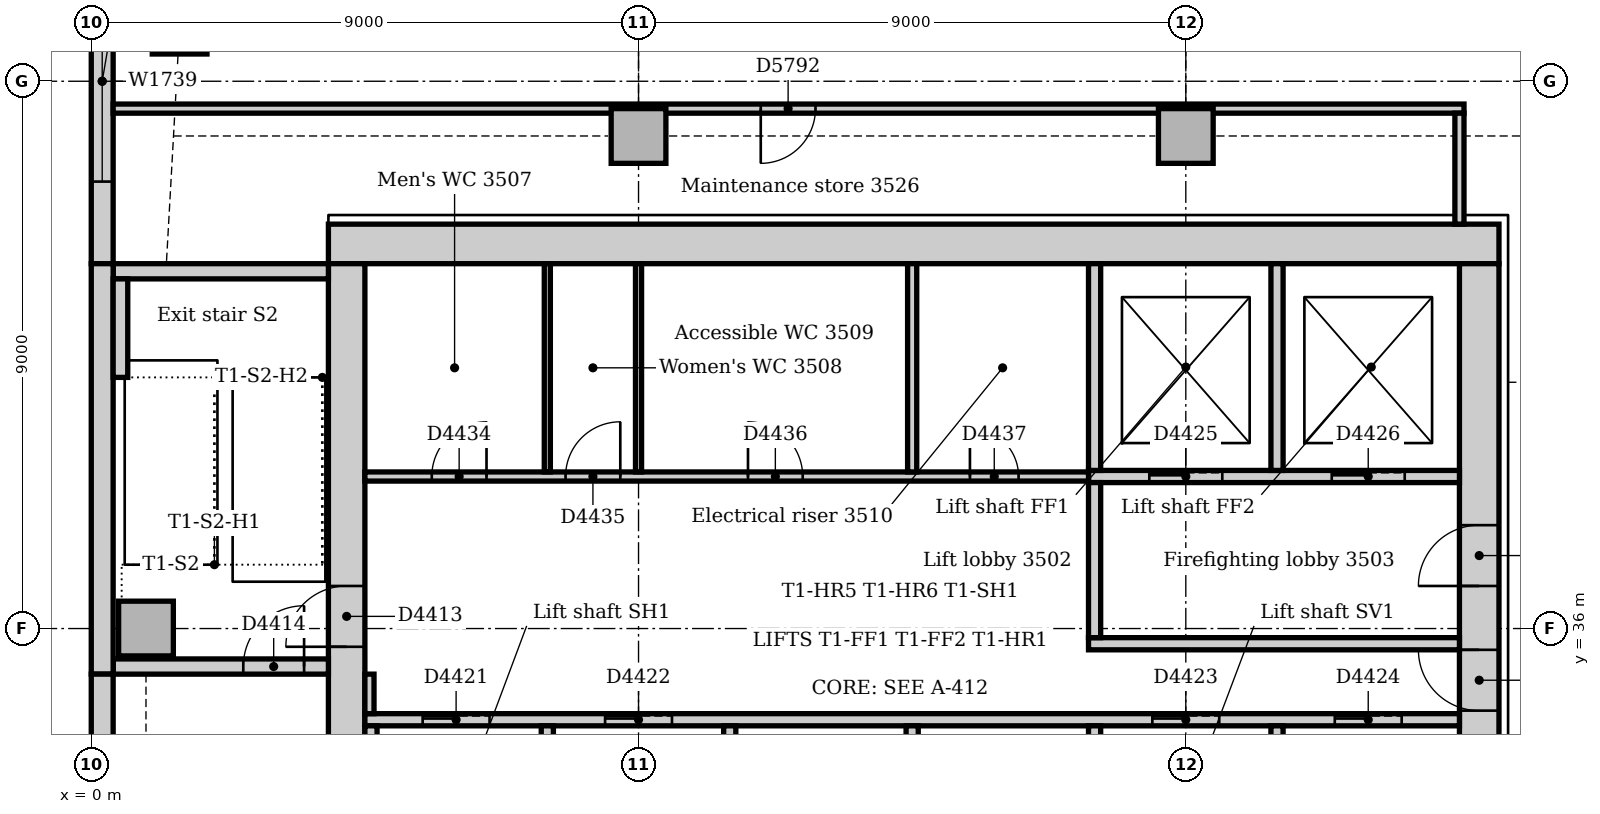
"""IFC4 building model, lengths in metres.
Left out: names, types, materials, properties, quantities, classifications, styles, units other than length and angle.
Written with IfcOpenShell. Run it as: python <this file> out.ifc"""

import sys

from ifc_helpers import new_model, si_unit, direction, frame, frame_2d, origin, origin_2d, place, context, subcontext, project, spatial, rectangle, extrude, element, fill, save


model = new_model("IFC4")
c1 = context("Model", 3, precision=1e-05, world=origin(), true_north=direction((0.0, 1.0)))
c2 = subcontext(c1, "Body", "Model", "MODEL_VIEW")
j1 = project(units=[si_unit("LENGTHUNIT", "METRE"), si_unit("PLANEANGLEUNIT", "RADIAN")], contexts=[c1])
p1 = place(None, origin())
s1 = spatial("IfcSite", under=j1, at=p1, CompositionType="ELEMENT")
p2 = place(p1, origin())
s2 = spatial("IfcBuilding", under=s1, at=p2, CompositionType="ELEMENT")
p3 = place(p2, frame((0.0, 0.0, 149.0)))
s3 = spatial("IfcBuildingStorey", under=s2, at=p3, CompositionType="ELEMENT", Elevation=149.0)
p4 = place(p3, frame((23.15, 42.325, 0.0), z_axis=(0.0, 0.0, 1.0), x_axis=(-1.0, 0.0, 0.0)))
e1 = element("IfcWall", 1, at=p4, inside=s3, PredefinedType="SOLIDWALL", context=c2, shape_type="SweptSolid", body=[
    extrude(rectangle(XDim=19.25, YDim=0.65, at=frame_2d((9.625, 0.0))), origin(), (0.0, 0.0, 1.0), 4.0),
])
p5 = place(p3, frame((22.825, 31.5, 0.0), z_axis=(0.0, 0.0, 1.0), x_axis=(0.0, 1.0, 0.0)))
e2 = element("IfcWall", 2, at=p5, inside=s3, PredefinedType="SOLIDWALL", context=c2, shape_type="SweptSolid", body=[
    extrude(rectangle(XDim=10.5, YDim=0.65, at=frame_2d((5.25, 0.0))), origin(), (0.0, 0.0, 1.0), 4.0),
])
p6 = place(p5, frame((3.15, 0.0, 0.0)))
e3 = element("IfcOpeningElement", 3, at=p6, cuts=e2, PredefinedType="OPENING", context=c2, shape_type="SweptSolid", body=[
    extrude(rectangle(XDim=1.0, YDim=2.1, at=frame_2d((0.5, 1.05))), frame((0.0, 0.335, 0.0), z_axis=(0.0, -1.0, 0.0), x_axis=(1.0, 0.0, 0.0)), (0.0, 0.0, 1.0), 0.67),
])
p7 = place(p5, frame((5.2, 0.0, 0.0)))
e4 = element("IfcOpeningElement", 4, at=p7, cuts=e2, PredefinedType="OPENING", context=c2, shape_type="SweptSolid", body=[
    extrude(rectangle(XDim=1.0, YDim=2.1, at=frame_2d((0.5, 1.05))), frame((0.0, 0.335, 0.0), z_axis=(0.0, -1.0, 0.0), x_axis=(1.0, 0.0, 0.0)), (0.0, 0.0, 1.0), 0.67),
])
p8 = place(p3, frame((4.2, 42.0, 0.0), z_axis=(0.0, 0.0, 1.0), x_axis=(0.0, -1.0, 0.0)))
e5 = element("IfcWall", 5, at=p8, inside=s3, PredefinedType="SOLIDWALL", context=c2, shape_type="SweptSolid", body=[
    extrude(rectangle(XDim=10.5, YDim=0.6, at=frame_2d((5.25, 0.0))), origin(), (0.0, 0.0, 1.0), 4.0),
])
p9 = place(p8, frame((5.3, 0.0, 0.0)))
e6 = element("IfcOpeningElement", 6, at=p9, cuts=e5, PredefinedType="OPENING", context=c2, shape_type="SweptSolid", body=[
    extrude(rectangle(XDim=1.0, YDim=2.1, at=frame_2d((0.5, 1.05))), frame((0.0, 0.31, 0.0), z_axis=(0.0, -1.0, 0.0), x_axis=(1.0, 0.0, 0.0)), (0.0, 0.0, 1.0), 0.62),
])
p10 = place(p3, frame((0.36, 35.375, 0.0), z_axis=(0.0, 0.0, 1.0), x_axis=(1.0, 0.0, 0.0)))
e7 = element("IfcWall", 7, at=p10, inside=s3, PredefinedType="SOLIDWALL", context=c2, shape_type="SweptSolid", body=[
    extrude(rectangle(XDim=3.54, YDim=0.25, at=frame_2d((1.77, 0.0))), origin(), (0.0, 0.0, 1.0), 4.0),
])
p11 = place(p10, frame((2.14, 0.0, 0.0)))
e8 = element("IfcOpeningElement", 8, at=p11, cuts=e7, PredefinedType="OPENING", context=c2, shape_type="SweptSolid", body=[
    extrude(rectangle(XDim=1.0, YDim=2.1, at=frame_2d((0.5, 1.05))), frame((0.0, 0.135, 0.0), z_axis=(0.0, -1.0, 0.0), x_axis=(1.0, 0.0, 0.0)), (0.0, 0.0, 1.0), 0.27),
])
p12 = place(p3, frame((3.9, 41.875, 0.0), z_axis=(0.0, 0.0, 1.0), x_axis=(-1.0, 0.0, 0.0)))
e9 = element("IfcWall", 9, at=p12, inside=s3, PredefinedType="SOLIDWALL", context=c2, shape_type="SweptSolid", body=[
    extrude(rectangle(XDim=3.54, YDim=0.25, at=frame_2d((1.77, 0.0))), origin(), (0.0, 0.0, 1.0), 4.0),
])
p13 = place(p3, frame((0.9, 36.0, 0.0), z_axis=(0.0, 0.0, 1.0), x_axis=(1.0, 0.0, 0.0)))
e10 = element("IfcColumn", 10, at=p13, inside=s3, PredefinedType="COLUMN", context=c2, shape_type="SweptSolid", body=[
    extrude(rectangle(XDim=0.9, YDim=0.9, at=origin_2d()), origin(), (0.0, 0.0, 1.0), 4.0),
])
for number, where, z_axis, x_axis in (
    (11, (1.453, 45.898, 0.0), (0.0, 0.0, 1.0), (1.0, 0.0, 0.0)),
    (12, (9.0, 44.1, 0.0), (0.0, 0.0, 1.0), (1.0, 0.0, 0.0)),
    (13, (18.0, 44.1, 0.0), (0.0, 0.0, 1.0), (1.0, 0.0, 0.0)),
):
    element("IfcColumn", number, at=place(p3, frame(where, z_axis=z_axis, x_axis=x_axis)), inside=s3, PredefinedType="COLUMN", context=c2, shape_type="SweptSolid", body=[
        extrude(rectangle(XDim=0.9, YDim=0.9, at=origin_2d()), origin(), (0.0, 0.0, 1.0), 3.85),
    ])
p14 = place(p3, frame((0.18, 49.757, 0.0), z_axis=(0.0, 0.0, 1.0), x_axis=(0.0, -1.0, 0.0)))
e14 = element("IfcWall", 14, at=p14, inside=s3, PredefinedType="STANDARD", context=c2, shape_type="SweptSolid", body=[
    extrude(rectangle(XDim=7.757, YDim=0.36, at=frame_2d((3.879, 0.0))), origin(), (0.0, 0.0, 1.0), 3.85),
])
p15 = place(p14, frame((3.107, 0.0, 0.9)))
e15 = element("IfcOpeningElement", 15, at=p15, cuts=e14, PredefinedType="OPENING", context=c2, shape_type="SweptSolid", body=[
    extrude(rectangle(XDim=3.3, YDim=1.6, at=frame_2d((1.65, 0.8))), frame((0.0, 0.19, 0.0), z_axis=(0.0, -1.0, 0.0), x_axis=(1.0, 0.0, 0.0)), (0.0, 0.0, 1.0), 0.38),
])
p16 = place(p3, frame((0.18, 42.0, 0.0), z_axis=(0.0, 0.0, 1.0), x_axis=(0.0, -1.0, 0.0)))
e16 = element("IfcWall", 16, at=p16, inside=s3, PredefinedType="STANDARD", context=c2, shape_type="SweptSolid", body=[
    extrude(rectangle(XDim=6.75, YDim=0.36, at=frame_2d((3.375, 0.0))), origin(), (0.0, 0.0, 1.0), 3.85),
])
p17 = place(p3, frame((0.18, 35.25, 0.0), z_axis=(0.0, 0.0, 1.0), x_axis=(0.0, -1.0, 0.0)))
e17 = element("IfcWall", 17, at=p17, inside=s3, PredefinedType="STANDARD", context=c2, shape_type="SweptSolid", body=[
    extrude(rectangle(XDim=7.5, YDim=0.36, at=frame_2d((3.75, 0.0))), origin(), (0.0, 0.0, 1.0), 3.85),
])
p18 = place(p3, frame((0.48, 40.13, 0.0), z_axis=(0.0, 0.0, 1.0), x_axis=(0.0, 1.0, 0.0)))
e18 = element("IfcWall", 18, at=p18, inside=s3, PredefinedType="STANDARD", context=c2, shape_type="SweptSolid", body=[
    extrude(rectangle(XDim=1.62, YDim=0.24, at=frame_2d((0.81, 0.0))), origin(), (0.0, 0.0, 1.0), 4.0),
])
p19 = place(p3, frame((16.4, 35.75, 0.0), z_axis=(0.0, 0.0, 1.0), x_axis=(1.0, 0.0, 0.0)))
e19 = element("IfcWall", 19, at=p19, inside=s3, PredefinedType="PARTITIONING", context=c2, shape_type="SweptSolid", body=[
    extrude(rectangle(XDim=6.1, YDim=0.2, at=frame_2d((3.05, 0.0))), origin(), (0.0, 0.0, 1.0), 3.85),
])
p20 = place(p3, frame((16.4, 38.5, 0.0), z_axis=(0.0, 0.0, 1.0), x_axis=(1.0, 0.0, 0.0)))
e20 = element("IfcWall", 20, at=p20, inside=s3, PredefinedType="PARTITIONING", context=c2, shape_type="SweptSolid", body=[
    extrude(rectangle(XDim=6.1, YDim=0.2, at=frame_2d((3.05, 0.0))), origin(), (0.0, 0.0, 1.0), 3.85),
])
p21 = place(p20, frame((1.0, 0.0, 0.0)))
e21 = element("IfcOpeningElement", 21, at=p21, cuts=e20, PredefinedType="OPENING", context=c2, shape_type="SweptSolid", body=[
    extrude(rectangle(XDim=1.2, YDim=2.1, at=frame_2d((0.6, 1.05))), frame((0.0, 0.11, 0.0), z_axis=(0.0, -1.0, 0.0), x_axis=(1.0, 0.0, 0.0)), (0.0, 0.0, 1.0), 0.22),
])
p22 = place(p20, frame((4.0, 0.0, 0.0)))
e22 = element("IfcOpeningElement", 22, at=p22, cuts=e20, PredefinedType="OPENING", context=c2, shape_type="SweptSolid", body=[
    extrude(rectangle(XDim=1.2, YDim=2.1, at=frame_2d((0.6, 1.05))), frame((0.0, 0.11, 0.0), z_axis=(0.0, -1.0, 0.0), x_axis=(1.0, 0.0, 0.0)), (0.0, 0.0, 1.0), 0.22),
])
p23 = place(p3, frame((16.5, 35.85, 0.0), z_axis=(0.0, 0.0, 1.0), x_axis=(0.0, 1.0, 0.0)))
e23 = element("IfcWall", 23, at=p23, inside=s3, PredefinedType="PARTITIONING", context=c2, shape_type="SweptSolid", body=[
    extrude(rectangle(XDim=2.55, YDim=0.2, at=frame_2d((1.275, 0.0))), origin(), (0.0, 0.0, 1.0), 3.85),
])
p24 = place(p3, frame((4.5, 34.5, 0.0), z_axis=(0.0, 0.0, 1.0), x_axis=(1.0, 0.0, 0.0)))
e24 = element("IfcWall", 24, at=p24, inside=s3, PredefinedType="PARTITIONING", context=c2, shape_type="SweptSolid", body=[
    extrude(rectangle(XDim=18.0, YDim=0.2, at=frame_2d((9.0, 0.0))), origin(), (0.0, 0.0, 1.0), 3.85),
])
p25 = place(p24, frame((0.95, 0.0, 0.0)))
e25 = element("IfcOpeningElement", 25, at=p25, cuts=e24, PredefinedType="OPENING", context=c2, shape_type="SweptSolid", body=[
    extrude(rectangle(XDim=1.1, YDim=2.1, at=frame_2d((0.55, 1.05))), frame((0.0, 0.11, 0.0), z_axis=(0.0, -1.0, 0.0), x_axis=(1.0, 0.0, 0.0)), (0.0, 0.0, 1.0), 0.22),
])
p26 = place(p24, frame((3.95, 0.0, 0.0)))
e26 = element("IfcOpeningElement", 26, at=p26, cuts=e24, PredefinedType="OPENING", context=c2, shape_type="SweptSolid", body=[
    extrude(rectangle(XDim=1.1, YDim=2.1, at=frame_2d((0.55, 1.05))), frame((0.0, 0.11, 0.0), z_axis=(0.0, -1.0, 0.0), x_axis=(1.0, 0.0, 0.0)), (0.0, 0.0, 1.0), 0.22),
])
p27 = place(p24, frame((12.95, 0.0, 0.0)))
e27 = element("IfcOpeningElement", 27, at=p27, cuts=e24, PredefinedType="OPENING", context=c2, shape_type="SweptSolid", body=[
    extrude(rectangle(XDim=1.1, YDim=2.1, at=frame_2d((0.55, 1.05))), frame((0.0, 0.11, 0.0), z_axis=(0.0, -1.0, 0.0), x_axis=(1.0, 0.0, 0.0)), (0.0, 0.0, 1.0), 0.22),
])
p28 = place(p24, frame((15.95, 0.0, 0.0)))
e28 = element("IfcOpeningElement", 28, at=p28, cuts=e24, PredefinedType="OPENING", context=c2, shape_type="SweptSolid", body=[
    extrude(rectangle(XDim=1.1, YDim=2.1, at=frame_2d((0.55, 1.05))), frame((0.0, 0.11, 0.0), z_axis=(0.0, -1.0, 0.0), x_axis=(1.0, 0.0, 0.0)), (0.0, 0.0, 1.0), 0.22),
])
for number, where, z_axis, x_axis in (
    (29, (4.6, 31.75, 0.0), (0.0, 0.0, 1.0), (0.0, 1.0, 0.0)),
    (30, (7.5, 31.75, 0.0), (0.0, 0.0, 1.0), (0.0, 1.0, 0.0)),
    (31, (10.5, 31.75, 0.0), (0.0, 0.0, 1.0), (0.0, 1.0, 0.0)),
    (32, (13.5, 31.75, 0.0), (0.0, 0.0, 1.0), (0.0, 1.0, 0.0)),
    (33, (16.5, 31.75, 0.0), (0.0, 0.0, 1.0), (0.0, 1.0, 0.0)),
    (34, (19.5, 31.75, 0.0), (0.0, 0.0, 1.0), (0.0, 1.0, 0.0)),
):
    element("IfcWall", number, at=place(p3, frame(where, z_axis=z_axis, x_axis=x_axis)), inside=s3, PredefinedType="PARTITIONING", context=c2, shape_type="SweptSolid", body=[
        extrude(rectangle(XDim=2.65, YDim=0.2, at=frame_2d((1.325, 0.0))), origin(), (0.0, 0.0, 1.0), 3.85),
    ])
for number, where, z_axis, x_axis in (
    (35, (16.5, 38.6, 0.0), (0.0, 0.0, 1.0), (0.0, 1.0, 0.0)),
    (36, (19.5, 38.6, 0.0), (0.0, 0.0, 1.0), (0.0, 1.0, 0.0)),
):
    element("IfcWall", number, at=place(p3, frame(where, z_axis=z_axis, x_axis=x_axis)), inside=s3, PredefinedType="PARTITIONING", context=c2, shape_type="SweptSolid", body=[
        extrude(rectangle(XDim=3.4, YDim=0.2, at=frame_2d((1.7, 0.0))), origin(), (0.0, 0.0, 1.0), 3.85),
    ])
p29 = place(p3, frame((0.36, 44.55, 0.0), z_axis=(0.0, 0.0, 1.0), x_axis=(1.0, 0.0, 0.0)))
e37 = element("IfcWall", 37, at=p29, inside=s3, PredefinedType="PARTITIONING", context=c2, shape_type="SweptSolid", body=[
    extrude(rectangle(XDim=22.215, YDim=0.15, at=frame_2d((11.107, 0.0))), origin(), (0.0, 0.0, 1.0), 3.85),
])
p30 = place(p29, frame((10.65, 0.0, 0.0)))
e38 = element("IfcOpeningElement", 38, at=p30, cuts=e37, PredefinedType="OPENING", context=c2, shape_type="SweptSolid", body=[
    extrude(rectangle(XDim=0.9, YDim=2.1, at=frame_2d((0.45, 1.05))), frame((0.0, 0.085, 0.0), z_axis=(0.0, -1.0, 0.0), x_axis=(1.0, 0.0, 0.0)), (0.0, 0.0, 1.0), 0.17),
])
p31 = place(p3, frame((4.5, 38.5, 0.0), z_axis=(0.0, 0.0, 1.0), x_axis=(1.0, 0.0, 0.0)))
e39 = element("IfcWall", 39, at=p31, inside=s3, PredefinedType="PARTITIONING", context=c2, shape_type="SweptSolid", body=[
    extrude(rectangle(XDim=11.9, YDim=0.15, at=frame_2d((5.95, 0.0))), origin(), (0.0, 0.0, 1.0), 3.85),
])
p32 = place(p31, frame((1.1, 0.0, 0.0)))
e40 = element("IfcOpeningElement", 40, at=p32, cuts=e39, PredefinedType="OPENING", context=c2, shape_type="SweptSolid", body=[
    extrude(rectangle(XDim=0.9, YDim=2.1, at=frame_2d((0.45, 1.05))), frame((0.0, 0.085, 0.0), z_axis=(0.0, -1.0, 0.0), x_axis=(1.0, 0.0, 0.0)), (0.0, 0.0, 1.0), 0.17),
])
p33 = place(p31, frame((3.3, 0.0, 0.0)))
e41 = element("IfcOpeningElement", 41, at=p33, cuts=e39, PredefinedType="OPENING", context=c2, shape_type="SweptSolid", body=[
    extrude(rectangle(XDim=0.9, YDim=2.1, at=frame_2d((0.45, 1.05))), frame((0.0, 0.085, 0.0), z_axis=(0.0, -1.0, 0.0), x_axis=(1.0, 0.0, 0.0)), (0.0, 0.0, 1.0), 0.17),
])
p34 = place(p31, frame((6.3, 0.0, 0.0)))
e42 = element("IfcOpeningElement", 42, at=p34, cuts=e39, PredefinedType="OPENING", context=c2, shape_type="SweptSolid", body=[
    extrude(rectangle(XDim=0.9, YDim=2.1, at=frame_2d((0.45, 1.05))), frame((0.0, 0.085, 0.0), z_axis=(0.0, -1.0, 0.0), x_axis=(1.0, 0.0, 0.0)), (0.0, 0.0, 1.0), 0.17),
])
p35 = place(p31, frame((9.95, 0.0, 0.0)))
e43 = element("IfcOpeningElement", 43, at=p35, cuts=e39, PredefinedType="OPENING", context=c2, shape_type="SweptSolid", body=[
    extrude(rectangle(XDim=0.8, YDim=2.1, at=frame_2d((0.4, 1.05))), frame((0.0, 0.085, 0.0), z_axis=(0.0, -1.0, 0.0), x_axis=(1.0, 0.0, 0.0)), (0.0, 0.0, 1.0), 0.17),
])
p36 = place(p3, frame((22.5, 42.65, 0.0), z_axis=(0.0, 0.0, 1.0), x_axis=(0.0, 1.0, 0.0)))
e44 = element("IfcWall", 44, at=p36, inside=s3, PredefinedType="PARTITIONING", context=c2, shape_type="SweptSolid", body=[
    extrude(rectangle(XDim=1.825, YDim=0.15, at=frame_2d((0.912, 0.0))), origin(), (0.0, 0.0, 1.0), 3.85),
])
p37 = place(p3, frame((4.575, 34.6, 0.0), z_axis=(0.0, 0.0, 1.0), x_axis=(0.0, 1.0, 0.0)))
e45 = element("IfcWall", 45, at=p37, inside=s3, PredefinedType="PARTITIONING", context=c2, shape_type="SweptSolid", body=[
    extrude(rectangle(XDim=0.65, YDim=0.15, at=frame_2d((0.325, 0.0))), origin(), (0.0, 0.0, 1.0), 3.85),
])
p38 = place(p3, frame((13.5, 38.575, 0.0), z_axis=(0.0, 0.0, 1.0), x_axis=(0.0, 1.0, 0.0)))
e46 = element("IfcWall", 46, at=p38, inside=s3, PredefinedType="PARTITIONING", context=c2, shape_type="SweptSolid", body=[
    extrude(rectangle(XDim=3.425, YDim=0.15, at=frame_2d((1.712, 0.0))), origin(), (0.0, 0.0, 1.0), 3.85),
])
for number, where, z_axis, x_axis in (
    (47, (7.5, 38.575, 0.0), (0.0, 0.0, 1.0), (0.0, 1.0, 0.0)),
    (48, (9.0, 38.575, 0.0), (0.0, 0.0, 1.0), (0.0, 1.0, 0.0)),
):
    element("IfcWall", number, at=place(p3, frame(where, z_axis=z_axis, x_axis=x_axis)), inside=s3, PredefinedType="PARTITIONING", context=c2, shape_type="SweptSolid", body=[
        extrude(rectangle(XDim=3.425, YDim=0.1, at=frame_2d((1.712, 0.0))), origin(), (0.0, 0.0, 1.0), 3.85),
    ])
p39 = place(p15, origin())
e49 = element("IfcWindow", 49, at=p39, inside=s3, PartitioningType="SINGLE_PANEL", PredefinedType="WINDOW", context=c2, shape_type="SweptSolid", body=[
    extrude(rectangle(XDim=3.3, YDim=1.6, at=frame_2d((1.65, 0.8))), frame((0.0, 0.13, 0.0), z_axis=(0.0, -1.0, 0.0), x_axis=(1.0, 0.0, 0.0)), (0.0, 0.0, 1.0), 0.06),
])
fill(e15, e49)
p40 = place(p9, frame((1.0, 0.0, 0.0), z_axis=(0.0, 0.0, 1.0), x_axis=(-1.0, 0.0, 0.0)))
e50 = element("IfcDoor", 50, at=p40, inside=s3, OperationType="SINGLE_SWING_LEFT", PredefinedType="DOOR", context=c2, shape_type="SweptSolid", body=[
    extrude(rectangle(XDim=1.0, YDim=2.1, at=frame_2d((0.5, 1.05))), frame((0.0, 0.025, 0.0), z_axis=(0.0, -1.0, 0.0), x_axis=(1.0, 0.0, 0.0)), (0.0, 0.0, 1.0), 0.05),
])
fill(e6, e50)
p41 = place(p11, origin())
e51 = element("IfcDoor", 51, at=p41, inside=s3, OperationType="SINGLE_SWING_RIGHT", PredefinedType="DOOR", context=c2, shape_type="SweptSolid", body=[
    extrude(rectangle(XDim=1.0, YDim=2.1, at=frame_2d((0.5, 1.05))), frame((0.0, 0.025, 0.0), z_axis=(0.0, -1.0, 0.0), x_axis=(1.0, 0.0, 0.0)), (0.0, 0.0, 1.0), 0.05),
])
fill(e8, e51)
p42 = place(p25, origin())
e52 = element("IfcDoor", 52, at=p42, inside=s3, OperationType="SLIDING_TO_LEFT", PredefinedType="DOOR", context=c2, shape_type="SweptSolid", body=[
    extrude(rectangle(XDim=1.1, YDim=2.1, at=frame_2d((0.55, 1.05))), frame((0.0, 0.025, 0.0), z_axis=(0.0, -1.0, 0.0), x_axis=(1.0, 0.0, 0.0)), (0.0, 0.0, 1.0), 0.05),
])
fill(e25, e52)
p43 = place(p26, origin())
e53 = element("IfcDoor", 53, at=p43, inside=s3, OperationType="SLIDING_TO_LEFT", PredefinedType="DOOR", context=c2, shape_type="SweptSolid", body=[
    extrude(rectangle(XDim=1.1, YDim=2.1, at=frame_2d((0.55, 1.05))), frame((0.0, 0.025, 0.0), z_axis=(0.0, -1.0, 0.0), x_axis=(1.0, 0.0, 0.0)), (0.0, 0.0, 1.0), 0.05),
])
fill(e26, e53)
p44 = place(p27, origin())
e54 = element("IfcDoor", 54, at=p44, inside=s3, OperationType="SLIDING_TO_LEFT", PredefinedType="DOOR", context=c2, shape_type="SweptSolid", body=[
    extrude(rectangle(XDim=1.1, YDim=2.1, at=frame_2d((0.55, 1.05))), frame((0.0, 0.025, 0.0), z_axis=(0.0, -1.0, 0.0), x_axis=(1.0, 0.0, 0.0)), (0.0, 0.0, 1.0), 0.05),
])
fill(e27, e54)
p45 = place(p28, origin())
e55 = element("IfcDoor", 55, at=p45, inside=s3, OperationType="SLIDING_TO_LEFT", PredefinedType="DOOR", context=c2, shape_type="SweptSolid", body=[
    extrude(rectangle(XDim=1.1, YDim=2.1, at=frame_2d((0.55, 1.05))), frame((0.0, 0.025, 0.0), z_axis=(0.0, -1.0, 0.0), x_axis=(1.0, 0.0, 0.0)), (0.0, 0.0, 1.0), 0.05),
])
fill(e28, e55)
p46 = place(p21, origin())
e56 = element("IfcDoor", 56, at=p46, inside=s3, OperationType="SLIDING_TO_LEFT", PredefinedType="DOOR", context=c2, shape_type="SweptSolid", body=[
    extrude(rectangle(XDim=1.2, YDim=2.1, at=frame_2d((0.6, 1.05))), frame((0.0, 0.025, 0.0), z_axis=(0.0, -1.0, 0.0), x_axis=(1.0, 0.0, 0.0)), (0.0, 0.0, 1.0), 0.05),
])
fill(e21, e56)
p47 = place(p22, origin())
e57 = element("IfcDoor", 57, at=p47, inside=s3, OperationType="SLIDING_TO_LEFT", PredefinedType="DOOR", context=c2, shape_type="SweptSolid", body=[
    extrude(rectangle(XDim=1.2, YDim=2.1, at=frame_2d((0.6, 1.05))), frame((0.0, 0.025, 0.0), z_axis=(0.0, -1.0, 0.0), x_axis=(1.0, 0.0, 0.0)), (0.0, 0.0, 1.0), 0.05),
])
fill(e22, e57)
p48 = place(p6, origin())
e58 = element("IfcDoor", 58, at=p48, inside=s3, OperationType="SINGLE_SWING_RIGHT", PredefinedType="DOOR", context=c2, shape_type="SweptSolid", body=[
    extrude(rectangle(XDim=1.0, YDim=2.1, at=frame_2d((0.5, 1.05))), frame((0.0, 0.025, 0.0), z_axis=(0.0, -1.0, 0.0), x_axis=(1.0, 0.0, 0.0)), (0.0, 0.0, 1.0), 0.05),
])
fill(e3, e58)
p49 = place(p7, origin())
e59 = element("IfcDoor", 59, at=p49, inside=s3, OperationType="SINGLE_SWING_LEFT", PredefinedType="DOOR", context=c2, shape_type="SweptSolid", body=[
    extrude(rectangle(XDim=1.0, YDim=2.1, at=frame_2d((0.5, 1.05))), frame((0.0, 0.025, 0.0), z_axis=(0.0, -1.0, 0.0), x_axis=(1.0, 0.0, 0.0)), (0.0, 0.0, 1.0), 0.05),
])
fill(e4, e59)
p50 = place(p32, origin())
e60 = element("IfcDoor", 60, at=p50, inside=s3, OperationType="SINGLE_SWING_RIGHT", PredefinedType="DOOR", context=c2, shape_type="SweptSolid", body=[
    extrude(rectangle(XDim=0.9, YDim=2.1, at=frame_2d((0.45, 1.05))), frame((0.0, 0.025, 0.0), z_axis=(0.0, -1.0, 0.0), x_axis=(1.0, 0.0, 0.0)), (0.0, 0.0, 1.0), 0.05),
])
fill(e40, e60)
p51 = place(p33, origin())
e61 = element("IfcDoor", 61, at=p51, inside=s3, OperationType="SINGLE_SWING_RIGHT", PredefinedType="DOOR", context=c2, shape_type="SweptSolid", body=[
    extrude(rectangle(XDim=0.9, YDim=2.1, at=frame_2d((0.45, 1.05))), frame((0.0, 0.025, 0.0), z_axis=(0.0, -1.0, 0.0), x_axis=(1.0, 0.0, 0.0)), (0.0, 0.0, 1.0), 0.05),
])
fill(e41, e61)
p52 = place(p34, origin())
e62 = element("IfcDoor", 62, at=p52, inside=s3, OperationType="SINGLE_SWING_LEFT", PredefinedType="DOOR", context=c2, shape_type="SweptSolid", body=[
    extrude(rectangle(XDim=0.9, YDim=2.1, at=frame_2d((0.45, 1.05))), frame((0.0, 0.025, 0.0), z_axis=(0.0, -1.0, 0.0), x_axis=(1.0, 0.0, 0.0)), (0.0, 0.0, 1.0), 0.05),
])
fill(e42, e62)
p53 = place(p35, origin())
e63 = element("IfcDoor", 63, at=p53, inside=s3, OperationType="SINGLE_SWING_LEFT", PredefinedType="DOOR", context=c2, shape_type="SweptSolid", body=[
    extrude(rectangle(XDim=0.8, YDim=2.1, at=frame_2d((0.4, 1.05))), frame((0.0, 0.025, 0.0), z_axis=(0.0, -1.0, 0.0), x_axis=(1.0, 0.0, 0.0)), (0.0, 0.0, 1.0), 0.05),
])
fill(e43, e63)
p54 = place(p30, frame((0.9, 0.0, 0.0), z_axis=(0.0, 0.0, 1.0), x_axis=(-1.0, 0.0, 0.0)))
e64 = element("IfcDoor", 64, at=p54, inside=s3, OperationType="SINGLE_SWING_RIGHT", PredefinedType="DOOR", context=c2, shape_type="SweptSolid", body=[
    extrude(rectangle(XDim=0.9, YDim=2.1, at=frame_2d((0.45, 1.05))), frame((0.0, 0.025, 0.0), z_axis=(0.0, -1.0, 0.0), x_axis=(1.0, 0.0, 0.0)), (0.0, 0.0, 1.0), 0.05),
])
fill(e38, e64)
save(model, sys.argv[1])
